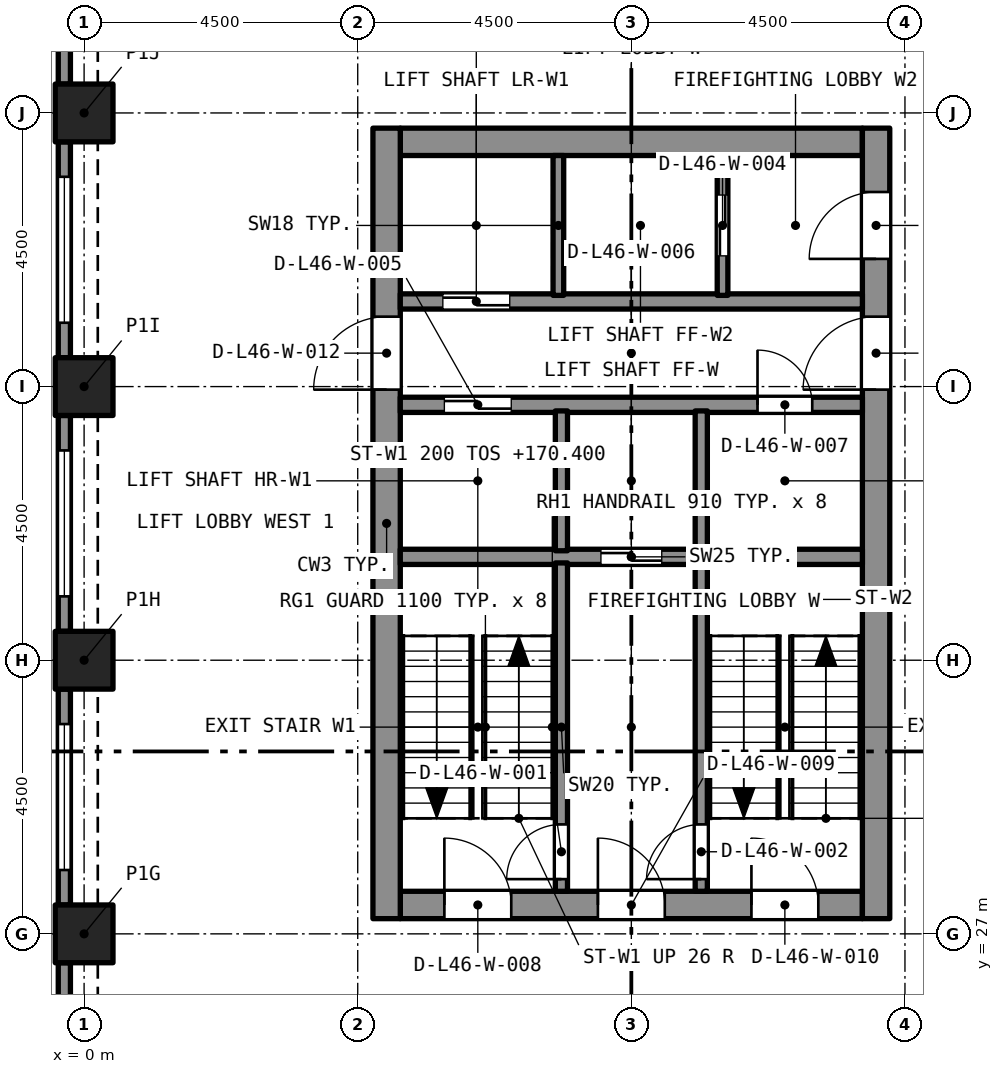
"""IFC4 building model, lengths in metres.
Left out: names, types, materials, properties, quantities, classifications, styles, units other than length and angle.
Written with IfcOpenShell. Run it as: python <this file> out.ifc"""

import sys

from ifc_helpers import new_model, si_unit, direction, frame, frame_2d, origin, origin_2d, place, context, subcontext, project, spatial, rectangle, extrude, element, fill, save


model = new_model("IFC4")
c1 = context("Model", 3, precision=1e-05, world=origin(), true_north=direction((0.0, 1.0)))
c2 = subcontext(c1, "Body", "Model", "MODEL_VIEW")
j1 = project(units=[si_unit("LENGTHUNIT", "METRE"), si_unit("PLANEANGLEUNIT", "RADIAN")], contexts=[c1])
p1 = place(None, origin())
s1 = spatial("IfcSite", under=j1, at=p1, CompositionType="ELEMENT")
p2 = place(p1, origin())
s2 = spatial("IfcBuilding", under=s1, at=p2, CompositionType="ELEMENT")
p3 = place(p2, frame((0.0, 0.0, 168.2)))
s3 = spatial("IfcBuildingStorey", under=s2, at=p3, CompositionType="ELEMENT", Elevation=168.2)
for number, where, z_axis, x_axis in (
    (1, (0.0, 27.0, 0.0), (0.0, 0.0, 1.0), (1.0, 0.0, 0.0)),
    (2, (0.0, 31.5, 0.0), (0.0, 0.0, 1.0), (1.0, 0.0, 0.0)),
    (3, (0.0, 36.0, 0.0), (0.0, 0.0, 1.0), (1.0, 0.0, 0.0)),
    (4, (0.0, 40.5, 0.0), (0.0, 0.0, 1.0), (1.0, 0.0, 0.0)),
):
    element("IfcColumn", number, at=place(p3, frame(where, z_axis=z_axis, x_axis=x_axis)), inside=s3, PredefinedType="COLUMN", context=c2, shape_type="SweptSolid", body=[
        extrude(rectangle(XDim=0.95, YDim=0.95, at=origin_2d()), origin(), (0.0, 0.0, 1.0), 4.4),
    ])
p4 = place(p3, frame((5.2, 27.475, 0.0), z_axis=(0.0, 0.0, 1.0), x_axis=(1.0, 0.0, 0.0)))
e5 = element("IfcWall", 5, at=p4, inside=s3, PredefinedType="SOLIDWALL", context=c2, shape_type="SweptSolid", body=[
    extrude(rectangle(XDim=7.6, YDim=0.45, at=frame_2d((3.8, 0.0))), origin(), (0.0, 0.0, 1.0), 4.4),
])
p5 = place(p4, frame((0.725, 0.0, 0.0)))
e6 = element("IfcOpeningElement", 6, at=p5, cuts=e5, PredefinedType="OPENING", context=c2, shape_type="SweptSolid", body=[
    extrude(rectangle(XDim=1.1, YDim=2.1, at=frame_2d((0.55, 1.05))), frame((0.0, 0.235, 0.0), z_axis=(0.0, -1.0, 0.0), x_axis=(1.0, 0.0, 0.0)), (0.0, 0.0, 1.0), 0.47),
])
p6 = place(p4, frame((3.25, 0.0, 0.0)))
e7 = element("IfcOpeningElement", 7, at=p6, cuts=e5, PredefinedType="OPENING", context=c2, shape_type="SweptSolid", body=[
    extrude(rectangle(XDim=1.1, YDim=2.1, at=frame_2d((0.55, 1.05))), frame((0.0, 0.235, 0.0), z_axis=(0.0, -1.0, 0.0), x_axis=(1.0, 0.0, 0.0)), (0.0, 0.0, 1.0), 0.47),
])
p7 = place(p4, frame((5.775, 0.0, 0.0)))
e8 = element("IfcOpeningElement", 8, at=p7, cuts=e5, PredefinedType="OPENING", context=c2, shape_type="SweptSolid", body=[
    extrude(rectangle(XDim=1.1, YDim=2.1, at=frame_2d((0.55, 1.05))), frame((0.0, 0.235, 0.0), z_axis=(0.0, -1.0, 0.0), x_axis=(1.0, 0.0, 0.0)), (0.0, 0.0, 1.0), 0.47),
])
p8 = place(p3, frame((5.2, 40.025, 0.0), z_axis=(0.0, 0.0, 1.0), x_axis=(1.0, 0.0, 0.0)))
e9 = element("IfcWall", 9, at=p8, inside=s3, PredefinedType="SOLIDWALL", context=c2, shape_type="SweptSolid", body=[
    extrude(rectangle(XDim=7.6, YDim=0.45, at=frame_2d((3.8, 0.0))), origin(), (0.0, 0.0, 1.0), 4.4),
])
p9 = place(p3, frame((4.975, 27.25, 0.0), z_axis=(0.0, 0.0, 1.0), x_axis=(0.0, 1.0, 0.0)))
e10 = element("IfcWall", 10, at=p9, inside=s3, PredefinedType="SOLIDWALL", context=c2, shape_type="SweptSolid", body=[
    extrude(rectangle(XDim=13.0, YDim=0.45, at=frame_2d((6.5, 0.0))), origin(), (0.0, 0.0, 1.0), 4.4),
])
p10 = place(p9, frame((8.7, 0.0, 0.0)))
e11 = element("IfcOpeningElement", 11, at=p10, cuts=e10, PredefinedType="OPENING", context=c2, shape_type="SweptSolid", body=[
    extrude(rectangle(XDim=1.2, YDim=2.1, at=frame_2d((0.6, 1.05))), frame((0.0, 0.235, 0.0), z_axis=(0.0, -1.0, 0.0), x_axis=(1.0, 0.0, 0.0)), (0.0, 0.0, 1.0), 0.47),
])
p11 = place(p3, frame((13.025, 27.25, 0.0), z_axis=(0.0, 0.0, 1.0), x_axis=(0.0, 1.0, 0.0)))
e12 = element("IfcWall", 12, at=p11, inside=s3, PredefinedType="SOLIDWALL", context=c2, shape_type="SweptSolid", body=[
    extrude(rectangle(XDim=13.0, YDim=0.45, at=frame_2d((6.5, 0.0))), origin(), (0.0, 0.0, 1.0), 4.4),
])
p12 = place(p11, frame((10.85, 0.0, 0.0)))
e13 = element("IfcOpeningElement", 13, at=p12, cuts=e12, PredefinedType="OPENING", context=c2, shape_type="SweptSolid", body=[
    extrude(rectangle(XDim=1.1, YDim=2.1, at=frame_2d((0.55, 1.05))), frame((0.0, 0.235, 0.0), z_axis=(0.0, -1.0, 0.0), x_axis=(1.0, 0.0, 0.0)), (0.0, 0.0, 1.0), 0.47),
])
p13 = place(p11, frame((8.7, 0.0, 0.0)))
e14 = element("IfcOpeningElement", 14, at=p13, cuts=e12, PredefinedType="OPENING", context=c2, shape_type="SweptSolid", body=[
    extrude(rectangle(XDim=1.2, YDim=2.1, at=frame_2d((0.6, 1.05))), frame((0.0, 0.235, 0.0), z_axis=(0.0, -1.0, 0.0), x_axis=(1.0, 0.0, 0.0)), (0.0, 0.0, 1.0), 0.47),
])
p14 = place(p3, frame((-0.325, 40.975, 0.0), z_axis=(0.0, 0.0, 1.0), x_axis=(0.0, 1.0, 0.0)))
e15 = element("IfcWall", 15, at=p14, inside=s3, PredefinedType="SOLIDWALL", context=c2, shape_type="SweptSolid", body=[
    extrude(rectangle(XDim=3.55, YDim=0.2, at=frame_2d((1.775, 0.0))), origin(), (0.0, 0.0, 1.0), 4.4),
])
p15 = place(p14, frame((0.575, 0.0, 0.45)))
e16 = element("IfcOpeningElement", 16, at=p15, cuts=e15, PredefinedType="OPENING", context=c2, shape_type="SweptSolid", body=[
    extrude(rectangle(XDim=2.4, YDim=2.55, at=frame_2d((1.2, 1.275))), frame((0.0, 0.11, 0.0), z_axis=(0.0, -1.0, 0.0), x_axis=(1.0, 0.0, 0.0)), (0.0, 0.0, 1.0), 0.22),
])
p16 = place(p3, frame((-0.325, 36.475, 0.0), z_axis=(0.0, 0.0, 1.0), x_axis=(0.0, 1.0, 0.0)))
e17 = element("IfcWall", 17, at=p16, inside=s3, PredefinedType="SOLIDWALL", context=c2, shape_type="SweptSolid", body=[
    extrude(rectangle(XDim=3.55, YDim=0.2, at=frame_2d((1.775, 0.0))), origin(), (0.0, 0.0, 1.0), 4.4),
])
p17 = place(p16, frame((0.575, 0.0, 0.45)))
e18 = element("IfcOpeningElement", 18, at=p17, cuts=e17, PredefinedType="OPENING", context=c2, shape_type="SweptSolid", body=[
    extrude(rectangle(XDim=2.4, YDim=2.55, at=frame_2d((1.2, 1.275))), frame((0.0, 0.11, 0.0), z_axis=(0.0, -1.0, 0.0), x_axis=(1.0, 0.0, 0.0)), (0.0, 0.0, 1.0), 0.22),
])
p18 = place(p3, frame((-0.325, 31.975, 0.0), z_axis=(0.0, 0.0, 1.0), x_axis=(0.0, 1.0, 0.0)))
e19 = element("IfcWall", 19, at=p18, inside=s3, PredefinedType="SOLIDWALL", context=c2, shape_type="SweptSolid", body=[
    extrude(rectangle(XDim=3.55, YDim=0.2, at=frame_2d((1.775, 0.0))), origin(), (0.0, 0.0, 1.0), 4.4),
])
p19 = place(p18, frame((0.575, 0.0, 0.45)))
e20 = element("IfcOpeningElement", 20, at=p19, cuts=e19, PredefinedType="OPENING", context=c2, shape_type="SweptSolid", body=[
    extrude(rectangle(XDim=2.4, YDim=2.55, at=frame_2d((1.2, 1.275))), frame((0.0, 0.11, 0.0), z_axis=(0.0, -1.0, 0.0), x_axis=(1.0, 0.0, 0.0)), (0.0, 0.0, 1.0), 0.22),
])
p20 = place(p3, frame((-0.325, 27.475, 0.0), z_axis=(0.0, 0.0, 1.0), x_axis=(0.0, 1.0, 0.0)))
e21 = element("IfcWall", 21, at=p20, inside=s3, PredefinedType="SOLIDWALL", context=c2, shape_type="SweptSolid", body=[
    extrude(rectangle(XDim=3.55, YDim=0.2, at=frame_2d((1.775, 0.0))), origin(), (0.0, 0.0, 1.0), 4.4),
])
p21 = place(p20, frame((0.575, 0.0, 0.45)))
e22 = element("IfcOpeningElement", 22, at=p21, cuts=e21, PredefinedType="OPENING", context=c2, shape_type="SweptSolid", body=[
    extrude(rectangle(XDim=2.4, YDim=2.55, at=frame_2d((1.2, 1.275))), frame((0.0, 0.11, 0.0), z_axis=(0.0, -1.0, 0.0), x_axis=(1.0, 0.0, 0.0)), (0.0, 0.0, 1.0), 0.22),
])
p22 = place(p3, frame((-0.325, 22.975, 0.0), z_axis=(0.0, 0.0, 1.0), x_axis=(0.0, 1.0, 0.0)))
e23 = element("IfcWall", 23, at=p22, inside=s3, PredefinedType="SOLIDWALL", context=c2, shape_type="SweptSolid", body=[
    extrude(rectangle(XDim=3.55, YDim=0.2, at=frame_2d((1.775, 0.0))), origin(), (0.0, 0.0, 1.0), 4.4),
])
p23 = place(p22, frame((0.575, 0.0, 0.45)))
e24 = element("IfcOpeningElement", 24, at=p23, cuts=e23, PredefinedType="OPENING", context=c2, shape_type="SweptSolid", body=[
    extrude(rectangle(XDim=2.4, YDim=2.55, at=frame_2d((1.2, 1.275))), frame((0.0, 0.11, 0.0), z_axis=(0.0, -1.0, 0.0), x_axis=(1.0, 0.0, 0.0)), (0.0, 0.0, 1.0), 0.22),
])
p24 = place(p3, frame((5.2, 33.2, 0.0), z_axis=(0.0, 0.0, 1.0), x_axis=(1.0, 0.0, 0.0)))
e25 = element("IfcWall", 25, at=p24, inside=s3, PredefinedType="SOLIDWALL", context=c2, shape_type="SweptSolid", body=[
    extrude(rectangle(XDim=7.6, YDim=0.25, at=frame_2d((3.8, 0.0))), origin(), (0.0, 0.0, 1.0), 4.1),
])
p25 = place(p24, frame((3.3, 0.0, 0.0)))
e26 = element("IfcOpeningElement", 26, at=p25, cuts=e25, PredefinedType="OPENING", context=c2, shape_type="SweptSolid", body=[
    extrude(rectangle(XDim=1.0, YDim=2.1, at=frame_2d((0.5, 1.05))), frame((0.0, 0.135, 0.0), z_axis=(0.0, -1.0, 0.0), x_axis=(1.0, 0.0, 0.0)), (0.0, 0.0, 1.0), 0.27),
])
p26 = place(p3, frame((5.2, 35.7, 0.0), z_axis=(0.0, 0.0, 1.0), x_axis=(1.0, 0.0, 0.0)))
e27 = element("IfcWall", 27, at=p26, inside=s3, PredefinedType="SOLIDWALL", context=c2, shape_type="SweptSolid", body=[
    extrude(rectangle(XDim=7.6, YDim=0.25, at=frame_2d((3.8, 0.0))), origin(), (0.0, 0.0, 1.0), 4.1),
])
p27 = place(p26, frame((0.725, 0.0, 0.0)))
e28 = element("IfcOpeningElement", 28, at=p27, cuts=e27, PredefinedType="OPENING", context=c2, shape_type="SweptSolid", body=[
    extrude(rectangle(XDim=1.1, YDim=2.4, at=frame_2d((0.55, 1.2))), frame((0.0, 0.135, 0.0), z_axis=(0.0, -1.0, 0.0), x_axis=(1.0, 0.0, 0.0)), (0.0, 0.0, 1.0), 0.27),
])
p28 = place(p26, frame((5.875, 0.0, 0.0)))
e29 = element("IfcOpeningElement", 29, at=p28, cuts=e27, PredefinedType="OPENING", context=c2, shape_type="SweptSolid", body=[
    extrude(rectangle(XDim=0.9, YDim=2.1, at=frame_2d((0.45, 1.05))), frame((0.0, 0.135, 0.0), z_axis=(0.0, -1.0, 0.0), x_axis=(1.0, 0.0, 0.0)), (0.0, 0.0, 1.0), 0.27),
])
p29 = place(p3, frame((5.2, 37.4, 0.0), z_axis=(0.0, 0.0, 1.0), x_axis=(1.0, 0.0, 0.0)))
e30 = element("IfcWall", 30, at=p29, inside=s3, PredefinedType="SOLIDWALL", context=c2, shape_type="SweptSolid", body=[
    extrude(rectangle(XDim=7.6, YDim=0.25, at=frame_2d((3.8, 0.0))), origin(), (0.0, 0.0, 1.0), 4.1),
])
p30 = place(p29, frame((0.7, 0.0, 0.0)))
e31 = element("IfcOpeningElement", 31, at=p30, cuts=e30, PredefinedType="OPENING", context=c2, shape_type="SweptSolid", body=[
    extrude(rectangle(XDim=1.1, YDim=2.4, at=frame_2d((0.55, 1.2))), frame((0.0, 0.135, 0.0), z_axis=(0.0, -1.0, 0.0), x_axis=(1.0, 0.0, 0.0)), (0.0, 0.0, 1.0), 0.27),
])
p31 = place(p3, frame((7.85, 27.7, 0.0), z_axis=(0.0, 0.0, 1.0), x_axis=(0.0, 1.0, 0.0)))
e32 = element("IfcWall", 32, at=p31, inside=s3, PredefinedType="SOLIDWALL", context=c2, shape_type="SweptSolid", body=[
    extrude(rectangle(XDim=5.4, YDim=0.2, at=frame_2d((2.7, 0.0))), origin(), (0.0, 0.0, 1.0), 4.1),
])
p32 = place(p31, frame((0.2, 0.0, 0.0)))
e33 = element("IfcOpeningElement", 33, at=p32, cuts=e32, PredefinedType="OPENING", context=c2, shape_type="SweptSolid", body=[
    extrude(rectangle(XDim=0.9, YDim=2.1, at=frame_2d((0.45, 1.05))), frame((0.0, 0.11, 0.0), z_axis=(0.0, -1.0, 0.0), x_axis=(1.0, 0.0, 0.0)), (0.0, 0.0, 1.0), 0.22),
])
p33 = place(p3, frame((10.15, 27.7, 0.0), z_axis=(0.0, 0.0, 1.0), x_axis=(0.0, 1.0, 0.0)))
e34 = element("IfcWall", 34, at=p33, inside=s3, PredefinedType="SOLIDWALL", context=c2, shape_type="SweptSolid", body=[
    extrude(rectangle(XDim=5.4, YDim=0.2, at=frame_2d((2.7, 0.0))), origin(), (0.0, 0.0, 1.0), 4.1),
])
p34 = place(p33, frame((0.2, 0.0, 0.0)))
e35 = element("IfcOpeningElement", 35, at=p34, cuts=e34, PredefinedType="OPENING", context=c2, shape_type="SweptSolid", body=[
    extrude(rectangle(XDim=0.9, YDim=2.1, at=frame_2d((0.45, 1.05))), frame((0.0, 0.11, 0.0), z_axis=(0.0, -1.0, 0.0), x_axis=(1.0, 0.0, 0.0)), (0.0, 0.0, 1.0), 0.22),
])
for number, where, z_axis, x_axis in (
    (36, (7.85, 33.3, 0.0), (0.0, 0.0, 1.0), (0.0, 1.0, 0.0)),
    (37, (10.15, 33.3, 0.0), (0.0, 0.0, 1.0), (0.0, 1.0, 0.0)),
):
    element("IfcWall", number, at=place(p3, frame(where, z_axis=z_axis, x_axis=x_axis)), inside=s3, PredefinedType="SOLIDWALL", context=c2, shape_type="SweptSolid", body=[
        extrude(rectangle(XDim=2.3, YDim=0.2, at=frame_2d((1.15, 0.0))), origin(), (0.0, 0.0, 1.0), 4.1),
    ])
p35 = place(p3, frame((7.8, 37.5, 0.0), z_axis=(0.0, 0.0, 1.0), x_axis=(0.0, 1.0, 0.0)))
e38 = element("IfcWall", 38, at=p35, inside=s3, PredefinedType="SOLIDWALL", context=c2, shape_type="SweptSolid", body=[
    extrude(rectangle(XDim=2.3, YDim=0.175, at=frame_2d((1.15, 0.0))), origin(), (0.0, 0.0, 1.0), 4.1),
])
p36 = place(p3, frame((10.5, 37.5, 0.0), z_axis=(0.0, 0.0, 1.0), x_axis=(0.0, 1.0, 0.0)))
e39 = element("IfcWall", 39, at=p36, inside=s3, PredefinedType="SOLIDWALL", context=c2, shape_type="SweptSolid", body=[
    extrude(rectangle(XDim=2.3, YDim=0.175, at=frame_2d((1.15, 0.0))), origin(), (0.0, 0.0, 1.0), 4.1),
])
p37 = place(p36, frame((0.65, 0.0, 0.0)))
e40 = element("IfcOpeningElement", 40, at=p37, cuts=e39, PredefinedType="OPENING", context=c2, shape_type="SweptSolid", body=[
    extrude(rectangle(XDim=1.0, YDim=2.1, at=frame_2d((0.5, 1.05))), frame((0.0, 0.097, 0.0), z_axis=(0.0, -1.0, 0.0), x_axis=(1.0, 0.0, 0.0)), (0.0, 0.0, 1.0), 0.195),
])
p38 = place(p17, origin())
e41 = element("IfcWindow", 41, at=p38, inside=s3, PartitioningType="SINGLE_PANEL", PredefinedType="WINDOW", context=c2, shape_type="SweptSolid", body=[
    extrude(rectangle(XDim=2.4, YDim=2.55, at=frame_2d((1.2, 1.275))), frame((0.0, 0.03, 0.0), z_axis=(0.0, -1.0, 0.0), x_axis=(1.0, 0.0, 0.0)), (0.0, 0.0, 1.0), 0.06),
])
fill(e18, e41)
p39 = place(p19, origin())
e42 = element("IfcWindow", 42, at=p39, inside=s3, PartitioningType="SINGLE_PANEL", PredefinedType="WINDOW", context=c2, shape_type="SweptSolid", body=[
    extrude(rectangle(XDim=2.4, YDim=2.55, at=frame_2d((1.2, 1.275))), frame((0.0, 0.03, 0.0), z_axis=(0.0, -1.0, 0.0), x_axis=(1.0, 0.0, 0.0)), (0.0, 0.0, 1.0), 0.06),
])
fill(e20, e42)
p40 = place(p21, origin())
e43 = element("IfcWindow", 43, at=p40, inside=s3, PartitioningType="SINGLE_PANEL", PredefinedType="WINDOW", context=c2, shape_type="SweptSolid", body=[
    extrude(rectangle(XDim=2.4, YDim=2.55, at=frame_2d((1.2, 1.275))), frame((0.0, 0.03, 0.0), z_axis=(0.0, -1.0, 0.0), x_axis=(1.0, 0.0, 0.0)), (0.0, 0.0, 1.0), 0.06),
])
fill(e22, e43)
p41 = place(p32, origin())
e44 = element("IfcDoor", 44, at=p41, inside=s3, OperationType="SINGLE_SWING_LEFT", PredefinedType="DOOR", context=c2, shape_type="SweptSolid", body=[
    extrude(rectangle(XDim=0.9, YDim=2.1, at=frame_2d((0.45, 1.05))), frame((0.0, 0.025, 0.0), z_axis=(0.0, -1.0, 0.0), x_axis=(1.0, 0.0, 0.0)), (0.0, 0.0, 1.0), 0.05),
])
fill(e33, e44)
p42 = place(p34, origin())
e45 = element("IfcDoor", 45, at=p42, inside=s3, OperationType="SINGLE_SWING_LEFT", PredefinedType="DOOR", context=c2, shape_type="SweptSolid", body=[
    extrude(rectangle(XDim=0.9, YDim=2.1, at=frame_2d((0.45, 1.05))), frame((0.0, 0.025, 0.0), z_axis=(0.0, -1.0, 0.0), x_axis=(1.0, 0.0, 0.0)), (0.0, 0.0, 1.0), 0.05),
])
fill(e35, e45)
p43 = place(p30, origin())
e46 = element("IfcDoor", 46, at=p43, inside=s3, OperationType="SLIDING_TO_LEFT", PredefinedType="DOOR", context=c2, shape_type="SweptSolid", body=[
    extrude(rectangle(XDim=1.1, YDim=2.4, at=frame_2d((0.55, 1.2))), frame((0.0, 0.025, 0.0), z_axis=(0.0, -1.0, 0.0), x_axis=(1.0, 0.0, 0.0)), (0.0, 0.0, 1.0), 0.05),
])
fill(e31, e46)
p44 = place(p37, origin())
e47 = element("IfcDoor", 47, at=p44, inside=s3, OperationType="SLIDING_TO_LEFT", PredefinedType="DOOR", context=c2, shape_type="SweptSolid", body=[
    extrude(rectangle(XDim=1.0, YDim=2.1, at=frame_2d((0.5, 1.05))), frame((0.0, 0.025, 0.0), z_axis=(0.0, -1.0, 0.0), x_axis=(1.0, 0.0, 0.0)), (0.0, 0.0, 1.0), 0.05),
])
fill(e40, e47)
p45 = place(p27, origin())
e48 = element("IfcDoor", 48, at=p45, inside=s3, OperationType="SLIDING_TO_LEFT", PredefinedType="DOOR", context=c2, shape_type="SweptSolid", body=[
    extrude(rectangle(XDim=1.1, YDim=2.4, at=frame_2d((0.55, 1.2))), frame((0.0, 0.025, 0.0), z_axis=(0.0, -1.0, 0.0), x_axis=(1.0, 0.0, 0.0)), (0.0, 0.0, 1.0), 0.05),
])
fill(e28, e48)
p46 = place(p25, origin())
e49 = element("IfcDoor", 49, at=p46, inside=s3, OperationType="SLIDING_TO_LEFT", PredefinedType="DOOR", context=c2, shape_type="SweptSolid", body=[
    extrude(rectangle(XDim=1.0, YDim=2.1, at=frame_2d((0.5, 1.05))), frame((0.0, 0.025, 0.0), z_axis=(0.0, -1.0, 0.0), x_axis=(1.0, 0.0, 0.0)), (0.0, 0.0, 1.0), 0.05),
])
fill(e26, e49)
p47 = place(p28, origin())
e50 = element("IfcDoor", 50, at=p47, inside=s3, OperationType="SINGLE_SWING_LEFT", PredefinedType="DOOR", context=c2, shape_type="SweptSolid", body=[
    extrude(rectangle(XDim=0.9, YDim=2.1, at=frame_2d((0.45, 1.05))), frame((0.0, 0.025, 0.0), z_axis=(0.0, -1.0, 0.0), x_axis=(1.0, 0.0, 0.0)), (0.0, 0.0, 1.0), 0.05),
])
fill(e29, e50)
p48 = place(p5, origin())
e51 = element("IfcDoor", 51, at=p48, inside=s3, OperationType="SINGLE_SWING_LEFT", PredefinedType="DOOR", context=c2, shape_type="SweptSolid", body=[
    extrude(rectangle(XDim=1.1, YDim=2.1, at=frame_2d((0.55, 1.05))), frame((0.0, 0.025, 0.0), z_axis=(0.0, -1.0, 0.0), x_axis=(1.0, 0.0, 0.0)), (0.0, 0.0, 1.0), 0.05),
])
fill(e6, e51)
p49 = place(p6, origin())
e52 = element("IfcDoor", 52, at=p49, inside=s3, OperationType="SINGLE_SWING_LEFT", PredefinedType="DOOR", context=c2, shape_type="SweptSolid", body=[
    extrude(rectangle(XDim=1.1, YDim=2.1, at=frame_2d((0.55, 1.05))), frame((0.0, 0.025, 0.0), z_axis=(0.0, -1.0, 0.0), x_axis=(1.0, 0.0, 0.0)), (0.0, 0.0, 1.0), 0.05),
])
fill(e7, e52)
p50 = place(p7, origin())
e53 = element("IfcDoor", 53, at=p50, inside=s3, OperationType="SINGLE_SWING_LEFT", PredefinedType="DOOR", context=c2, shape_type="SweptSolid", body=[
    extrude(rectangle(XDim=1.1, YDim=2.1, at=frame_2d((0.55, 1.05))), frame((0.0, 0.025, 0.0), z_axis=(0.0, -1.0, 0.0), x_axis=(1.0, 0.0, 0.0)), (0.0, 0.0, 1.0), 0.05),
])
fill(e8, e53)
p51 = place(p12, origin())
e54 = element("IfcDoor", 54, at=p51, inside=s3, OperationType="SINGLE_SWING_LEFT", PredefinedType="DOOR", context=c2, shape_type="SweptSolid", body=[
    extrude(rectangle(XDim=1.1, YDim=2.1, at=frame_2d((0.55, 1.05))), frame((0.0, 0.025, 0.0), z_axis=(0.0, -1.0, 0.0), x_axis=(1.0, 0.0, 0.0)), (0.0, 0.0, 1.0), 0.05),
])
fill(e13, e54)
p52 = place(p10, origin())
e55 = element("IfcDoor", 55, at=p52, inside=s3, OperationType="SINGLE_SWING_LEFT", PredefinedType="DOOR", context=c2, shape_type="SweptSolid", body=[
    extrude(rectangle(XDim=1.2, YDim=2.1, at=frame_2d((0.6, 1.05))), frame((0.0, 0.025, 0.0), z_axis=(0.0, -1.0, 0.0), x_axis=(1.0, 0.0, 0.0)), (0.0, 0.0, 1.0), 0.05),
])
fill(e11, e55)
p53 = place(p13, origin())
e56 = element("IfcDoor", 56, at=p53, inside=s3, OperationType="SINGLE_SWING_LEFT", PredefinedType="DOOR", context=c2, shape_type="SweptSolid", body=[
    extrude(rectangle(XDim=1.2, YDim=2.1, at=frame_2d((0.6, 1.05))), frame((0.0, 0.025, 0.0), z_axis=(0.0, -1.0, 0.0), x_axis=(1.0, 0.0, 0.0)), (0.0, 0.0, 1.0), 0.05),
])
fill(e14, e56)
save(model, sys.argv[1])
